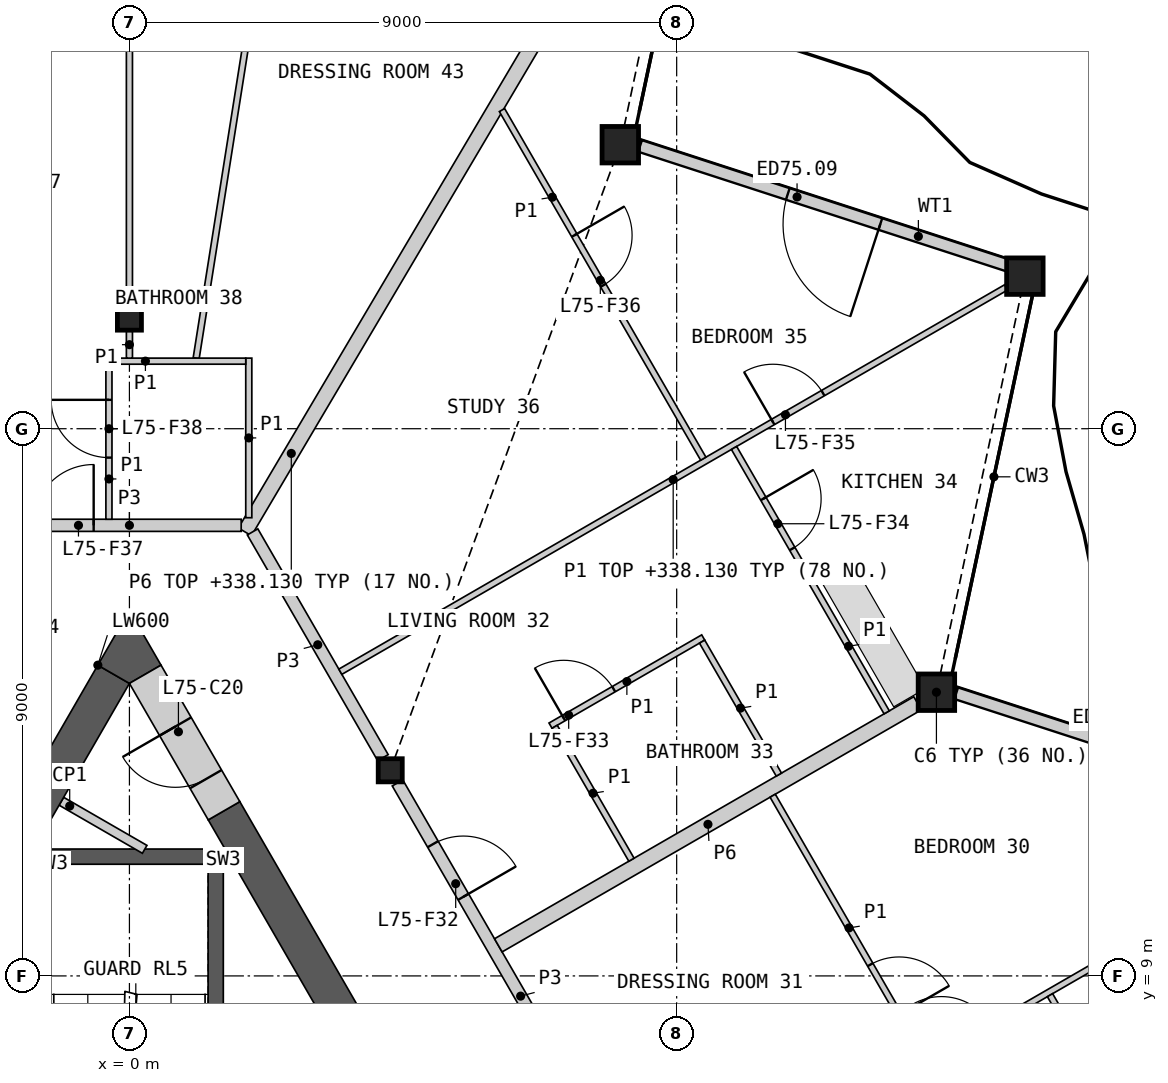
"""IFC4 building model, lengths in metres.
Left out: names, types, materials, properties, quantities, classifications, styles, units other than length and angle.
Written with IfcOpenShell. Run it as: python <this file> out.ifc"""

import sys

from ifc_helpers import new_model, si_unit, direction, frame, frame_2d, origin, origin_2d, place, context, subcontext, project, spatial, polyline, rectangle, hollow_rectangle, i_section, outline, extrude, element, fill, save


model = new_model("IFC4")
c1 = context("Model", 3, precision=1e-05, world=origin(), true_north=direction((0.0, 1.0)))
c2 = subcontext(c1, "Body", "Model", "MODEL_VIEW")
j1 = project(units=[si_unit("LENGTHUNIT", "METRE"), si_unit("PLANEANGLEUNIT", "RADIAN")], contexts=[c1])
p1 = place(None, origin())
s1 = spatial("IfcSite", under=j1, at=p1, CompositionType="ELEMENT")
p2 = place(p1, origin())
s2 = spatial("IfcBuilding", under=s1, at=p2, CompositionType="ELEMENT")
p3 = place(p2, frame((0.0, 0.0, 335.8)))
s3 = spatial("IfcBuildingStorey", under=s2, at=p3, CompositionType="ELEMENT", Elevation=335.8)
for number, where, z_axis, x_axis in (
    (1, (13.272, 13.666, 0.0), (0.0, 0.0, 1.0), (1.0, 0.0, 0.0)),
    (2, (14.727, 20.509, 0.0), (0.0, 0.0, 1.0), (1.0, 0.0, 0.0)),
    (3, (8.073, 22.671, 0.0), (0.0, 0.0, 1.0), (1.0, 0.0, 0.0)),
):
    element("IfcColumn", number, at=place(p3, frame(where, z_axis=z_axis, x_axis=x_axis)), inside=s3, PredefinedType="COLUMN", context=c2, shape_type="SweptSolid", body=[
        extrude(hollow_rectangle(XDim=0.6, YDim=0.6, WallThickness=0.04, at=origin_2d()), origin(), (0.0, 0.0, 1.0), 3.4),
    ])
for number, where, z_axis, x_axis in (
    (4, (0.0, 19.811, 0.0), (0.0, 0.0, 1.0), (1.0, 0.0, 0.0)),
    (5, (4.289, 12.382, 0.0), (0.0, 0.0, 1.0), (1.0, 0.0, 0.0)),
):
    element("IfcColumn", number, at=place(p3, frame(where, z_axis=z_axis, x_axis=x_axis)), inside=s3, PredefinedType="COLUMN", context=c2, shape_type="SweptSolid", body=[
        extrude(i_section(OverallWidth=0.396, OverallDepth=0.381, WebThickness=0.019, FlangeThickness=0.03, at=origin_2d()), origin(), (0.0, 0.0, 1.0), 3.4),
    ])
p4 = place(p3, frame((19.697, 11.667, 0.0), z_axis=(0.0, 0.0, 1.0), x_axis=(-0.951053926112, 0.309024966026, 0.0)))
e6 = element("IfcWall", 6, at=p4, inside=s3, PredefinedType="SOLIDWALL", context=c2, shape_type="SweptSolid", body=[
    extrude(rectangle(XDim=6.414, YDim=0.2, at=frame_2d((3.207, 0.0))), origin(), (0.0, 0.0, 1.0), 2.488),
])
p5 = place(p4, frame((2.262, 0.0, 0.0)))
e7 = element("IfcOpeningElement", 7, at=p5, cuts=e6, PredefinedType="OPENING", context=c2, shape_type="SweptSolid", body=[
    extrude(rectangle(XDim=1.6, YDim=2.25, at=frame_2d((0.8, 1.125))), frame((0.0, 0.11, 0.0), z_axis=(0.0, -1.0, 0.0), x_axis=(1.0, 0.0, 0.0)), (0.0, 0.0, 1.0), 0.22),
])
p6 = place(p3, frame((14.501, 20.667, 0.0), z_axis=(0.0, 0.0, 1.0), x_axis=(-0.951049165164, 0.309039617915, 0.0)))
e8 = element("IfcWall", 8, at=p6, inside=s3, PredefinedType="SOLIDWALL", context=c2, shape_type="SweptSolid", body=[
    extrude(rectangle(XDim=6.417, YDim=0.2, at=frame_2d((3.208, 0.0))), origin(), (0.0, 0.0, 1.0), 2.488),
])
p7 = place(p6, frame((2.262, 0.0, 0.0)))
e9 = element("IfcOpeningElement", 9, at=p7, cuts=e8, PredefinedType="OPENING", context=c2, shape_type="SweptSolid", body=[
    extrude(rectangle(XDim=1.6, YDim=2.25, at=frame_2d((0.8, 1.125))), frame((0.0, 0.11, 0.0), z_axis=(0.0, -1.0, 0.0), x_axis=(1.0, 0.0, 0.0)), (0.0, 0.0, 1.0), 0.22),
])
p8 = place(p3, origin())
e10 = element("IfcWall", 10, at=p8, inside=s3, PredefinedType="SHEAR", context=c2, shape_type="SweptSolid", body=[
    extrude(outline(polyline([(1.544, 5.237), (1.544, 11.087), (1.294, 10.837), (1.294, 5.237), (1.544, 5.237)])), origin(), (0.0, 0.0, 1.0), 3.1),
])
p9 = place(p3, origin())
e11 = element("IfcWall", 11, at=p9, inside=s3, PredefinedType="SHEAR", context=c2, shape_type="SweptSolid", body=[
    extrude(outline(polyline([(1.544, 11.087), (-1.544, 11.087), (-1.294, 10.837), (1.294, 10.837), (1.544, 11.087)])), origin(), (0.0, 0.0, 1.0), 3.1),
])
p10 = place(p3, frame((-1.119, 11.873, 0.0), z_axis=(0.0, 0.0, 1.0), x_axis=(0.865992812752, -0.500056445075, 0.0)))
e12 = element("IfcWall", 12, at=p10, inside=s3, PredefinedType="PARTITIONING", context=c2, shape_type="SweptSolid", body=[
    extrude(rectangle(XDim=1.582, YDim=0.15, at=frame_2d((0.791, 0.0))), origin(), (0.0, 0.0, 1.0), 3.1),
])
p11 = place(p3, frame((8.841, -0.902, 0.0), z_axis=(0.0, 0.0, 1.0), x_axis=(-0.499995618375, 0.866027933502, 0.0)))
e13 = element("IfcWall", 13, at=p11, inside=s3, PredefinedType="SHEAR", context=c2, shape_type="SweptSolid", body=[
    extrude(rectangle(XDim=14.571, YDim=0.6, at=frame_2d((7.285, 0.0))), origin(), (0.0, 0.0, 1.0), 3.1),
])
p12 = place(p3, frame((-0.26, 13.961, 0.0), z_axis=(0.0, 0.0, 1.0), x_axis=(-0.499980485389, -0.866036670257, 0.0)))
e14 = element("IfcWall", 14, at=p12, inside=s3, PredefinedType="SHEAR", context=c2, shape_type="SweptSolid", body=[
    extrude(rectangle(XDim=4.559, YDim=0.6, at=frame_2d((2.28, 0.0))), origin(), (0.0, 0.0, 1.0), 3.1),
])
p13 = place(p3, origin())
e15 = element("IfcWall", 15, at=p13, inside=s3, PredefinedType="SHEAR", context=c2, shape_type="SweptSolid", body=[
    extrude(outline(polyline([(-0.52, 14.111), (0.0, 15.011), (0.52, 14.111), (0.0, 13.811), (-0.52, 14.111)])), origin(), (0.0, 0.0, 1.0), 3.1),
])
p14 = place(p3, frame((1.556, 11.716, 0.0), z_axis=(0.0, 0.0, 1.0), x_axis=(-0.500018667571, 0.866014625789, 0.0)))
e16 = element("IfcWall", 16, at=p14, inside=s3, PredefinedType="SHEAR", context=c2, shape_type="SweptSolid", body=[
    extrude(rectangle(XDim=2.592, YDim=0.6, at=frame_2d((1.296, 0.0))), origin(), (0.0, 0.0, 1.0), 3.1),
])
p15 = place(p14, frame((0.6, 0.0, 0.0)))
e17 = element("IfcOpeningElement", 17, at=p15, cuts=e16, PredefinedType="OPENING", context=c2, shape_type="SweptSolid", body=[
    extrude(rectangle(XDim=1.0, YDim=2.1, at=frame_2d((0.5, 1.05))), frame((0.0, 0.31, 0.0), z_axis=(0.0, -1.0, 0.0), x_axis=(1.0, 0.0, 0.0)), (0.0, 0.0, 1.0), 0.62),
])
p16 = place(p3, frame((1.899, 16.303, 0.0), z_axis=(0.0, 0.0, 1.0), x_axis=(0.508895604687, 0.860828242758, 0.0)))
e18 = element("IfcWall", 18, at=p16, inside=s3, PredefinedType="PARTITIONING", context=c2, shape_type="SweptSolid", body=[
    extrude(rectangle(XDim=14.986, YDim=0.25, at=frame_2d((7.493, 0.0))), origin(), (0.0, 0.0, 1.0), 2.33),
])
p17 = place(p3, frame((4.409, 12.174, 0.0), z_axis=(0.0, 0.0, 1.0), x_axis=(0.499984266882, -0.866034487114, 0.0)))
e19 = element("IfcWall", 19, at=p17, inside=s3, PredefinedType="PARTITIONING", context=c2, shape_type="SweptSolid", body=[
    extrude(rectangle(XDim=8.099, YDim=0.2, at=frame_2d((4.049, 0.0))), origin(), (0.0, 0.0, 1.0), 3.1),
])
p18 = place(p17, frame((1.164, 0.0, 0.0)))
e20 = element("IfcOpeningElement", 20, at=p18, cuts=e19, PredefinedType="OPENING", context=c2, shape_type="SweptSolid", body=[
    extrude(rectangle(XDim=1.0, YDim=2.1, at=frame_2d((0.5, 1.05))), frame((0.0, 0.11, 0.0), z_axis=(0.0, -1.0, 0.0), x_axis=(1.0, 0.0, 0.0)), (0.0, 0.0, 1.0), 0.22),
])
p19 = place(p3, frame((6.067, 9.503, 0.0), z_axis=(0.0, 0.0, 1.0), x_axis=(0.866032392051, 0.499987895772, 0.0)))
e21 = element("IfcWall", 21, at=p19, inside=s3, PredefinedType="PARTITIONING", context=c2, shape_type="SweptSolid", body=[
    extrude(rectangle(XDim=7.962, YDim=0.25, at=frame_2d((3.981, 0.0))), origin(), (0.0, 0.0, 1.0), 2.33),
])
p20 = place(p3, frame((2.025, 16.303, 0.0), z_axis=(0.0, 0.0, 1.0), x_axis=(0.499978750566, -0.866037671803, 0.0)))
e22 = element("IfcWall", 22, at=p20, inside=s3, PredefinedType="PARTITIONING", context=c2, shape_type="SweptSolid", body=[
    extrude(rectangle(XDim=4.288, YDim=0.2, at=frame_2d((2.144, 0.0))), origin(), (0.0, 0.0, 1.0), 3.1),
])
p21 = place(p3, frame((-1.838, 16.411, 0.0), z_axis=(0.0, 0.0, 1.0), x_axis=(1.0, 0.0, 0.0)))
e23 = element("IfcWall", 23, at=p21, inside=s3, PredefinedType="PARTITIONING", context=c2, shape_type="SweptSolid", body=[
    extrude(rectangle(XDim=3.676, YDim=0.2, at=frame_2d((1.838, 0.0))), origin(), (0.0, 0.0, 1.0), 3.1),
])
p22 = place(p21, frame((0.25, 0.0, 0.0)))
e24 = element("IfcOpeningElement", 24, at=p22, cuts=e23, PredefinedType="OPENING", context=c2, shape_type="SweptSolid", body=[
    extrude(rectangle(XDim=1.0, YDim=2.1, at=frame_2d((0.5, 1.05))), frame((0.0, 0.11, 0.0), z_axis=(0.0, -1.0, 0.0), x_axis=(1.0, 0.0, 0.0)), (0.0, 0.0, 1.0), 0.22),
])
p23 = place(p3, frame((3.469, 14.003, 0.0), z_axis=(0.0, 0.0, 1.0), x_axis=(0.866021563384, 0.50000665171, 0.0)))
e25 = element("IfcWall", 25, at=p23, inside=s3, PredefinedType="PARTITIONING", context=c2, shape_type="SweptSolid", body=[
    extrude(rectangle(XDim=12.641, YDim=0.1, at=frame_2d((6.321, 0.0))), origin(), (0.0, 0.0, 1.0), 2.33),
])
p24 = place(p23, frame((8.215, 0.0, 0.0)))
e26 = element("IfcOpeningElement", 26, at=p24, cuts=e25, PredefinedType="OPENING", context=c2, shape_type="SweptSolid", body=[
    extrude(rectangle(XDim=0.95, YDim=2.1, at=frame_2d((0.475, 1.05))), frame((0.0, 0.06, 0.0), z_axis=(0.0, -1.0, 0.0), x_axis=(1.0, 0.0, 0.0)), (0.0, 0.0, 1.0), 0.12),
])
p25 = place(p3, frame((8.786, 5.073, 0.0), z_axis=(0.0, 0.0, 1.0), x_axis=(0.86602139559, 0.500006942333, 0.0)))
e27 = element("IfcWall", 27, at=p25, inside=s3, PredefinedType="PARTITIONING", context=c2, shape_type="SweptSolid", body=[
    extrude(rectangle(XDim=12.505, YDim=0.1, at=frame_2d((6.252, 0.0))), origin(), (0.0, 0.0, 1.0), 2.33),
])
p26 = place(p25, frame((5.275, 0.0, 0.0)))
e28 = element("IfcOpeningElement", 28, at=p26, cuts=e27, PredefinedType="OPENING", context=c2, shape_type="SweptSolid", body=[
    extrude(rectangle(XDim=0.95, YDim=2.1, at=frame_2d((0.475, 1.05))), frame((0.0, 0.06, 0.0), z_axis=(0.0, -1.0, 0.0), x_axis=(1.0, 0.0, 0.0)), (0.0, 0.0, 1.0), 0.12),
])
p27 = place(p3, frame((1.098, 19.16, 0.0), z_axis=(0.0, 0.0, 1.0), x_axis=(0.156426176129, 0.987689653394, 0.0)))
e29 = element("IfcWall", 29, at=p27, inside=s3, PredefinedType="PARTITIONING", context=c2, shape_type="SweptSolid", body=[
    extrude(rectangle(XDim=12.358, YDim=0.1, at=frame_2d((6.179, 0.0))), origin(), (0.0, 0.0, 1.0), 2.33),
])
p28 = place(p27, frame((7.255, 0.0, 0.0)))
e30 = element("IfcOpeningElement", 30, at=p28, cuts=e29, PredefinedType="OPENING", context=c2, shape_type="SweptSolid", body=[
    extrude(rectangle(XDim=0.95, YDim=2.1, at=frame_2d((0.475, 1.05))), frame((0.0, 0.06, 0.0), z_axis=(0.0, -1.0, 0.0), x_axis=(1.0, 0.0, 0.0)), (0.0, 0.0, 1.0), 0.12),
])
p29 = place(p3, frame((0.0, 20.019, 0.0), z_axis=(0.0, 0.0, 1.0), x_axis=(0.0, 1.0, 0.0)))
e31 = element("IfcWall", 31, at=p29, inside=s3, PredefinedType="PARTITIONING", context=c2, shape_type="SweptSolid", body=[
    extrude(rectangle(XDim=11.347, YDim=0.1, at=frame_2d((5.674, 0.0))), origin(), (0.0, 0.0, 1.0), 2.33),
])
p30 = place(p29, frame((7.723, 0.0, 0.0)))
e32 = element("IfcOpeningElement", 32, at=p30, cuts=e31, PredefinedType="OPENING", context=c2, shape_type="SweptSolid", body=[
    extrude(rectangle(XDim=0.95, YDim=2.1, at=frame_2d((0.475, 1.05))), frame((0.0, 0.06, 0.0), z_axis=(0.0, -1.0, 0.0), x_axis=(1.0, 0.0, 0.0)), (0.0, 0.0, 1.0), 0.12),
])
p31 = place(p3, frame((6.127, 23.241, 0.0), z_axis=(0.0, 0.0, 1.0), x_axis=(0.500021410345, -0.866013042163, 0.0)))
e33 = element("IfcWall", 33, at=p31, inside=s3, PredefinedType="PARTITIONING", context=c2, shape_type="SweptSolid", body=[
    extrude(rectangle(XDim=6.621, YDim=0.1, at=frame_2d((3.311, 0.0))), origin(), (0.0, 0.0, 1.0), 2.33),
])
p32 = place(p31, frame((2.379, 0.0, 0.0)))
e34 = element("IfcOpeningElement", 34, at=p32, cuts=e33, PredefinedType="OPENING", context=c2, shape_type="SweptSolid", body=[
    extrude(rectangle(XDim=0.95, YDim=2.1, at=frame_2d((0.475, 1.05))), frame((0.0, 0.06, 0.0), z_axis=(0.0, -1.0, 0.0), x_axis=(1.0, 0.0, 0.0)), (0.0, 0.0, 1.0), 0.12),
])
p33 = place(p3, frame((10.579, 11.964, 0.0), z_axis=(0.0, 0.0, 1.0), x_axis=(0.499972176429, -0.866041467135, 0.0)))
e35 = element("IfcWall", 35, at=p33, inside=s3, PredefinedType="PARTITIONING", context=c2, shape_type="SweptSolid", body=[
    extrude(rectangle(XDim=5.021, YDim=0.1, at=frame_2d((2.511, 0.0))), origin(), (0.0, 0.0, 1.0), 2.33),
])
p34 = place(p33, frame((3.209, 0.0, 0.0)))
e36 = element("IfcOpeningElement", 36, at=p34, cuts=e35, PredefinedType="OPENING", context=c2, shape_type="SweptSolid", body=[
    extrude(rectangle(XDim=0.95, YDim=2.1, at=frame_2d((0.475, 1.05))), frame((0.0, 0.06, 0.0), z_axis=(0.0, -1.0, 0.0), x_axis=(1.0, 0.0, 0.0)), (0.0, 0.0, 1.0), 0.12),
])
p35 = place(p3, frame((9.944, 17.684, 0.0), z_axis=(0.0, 0.0, 1.0), x_axis=(0.499972176429, -0.866041467135, 0.0)))
e37 = element("IfcWall", 37, at=p35, inside=s3, PredefinedType="PARTITIONING", context=c2, shape_type="SweptSolid", body=[
    extrude(rectangle(XDim=5.021, YDim=0.1, at=frame_2d((2.511, 0.0))), origin(), (0.0, 0.0, 1.0), 2.33),
])
p36 = place(p35, frame((0.964, 0.0, 0.0)))
e38 = element("IfcOpeningElement", 38, at=p36, cuts=e37, PredefinedType="OPENING", context=c2, shape_type="SweptSolid", body=[
    extrude(rectangle(XDim=0.95, YDim=2.1, at=frame_2d((0.475, 1.05))), frame((0.0, 0.06, 0.0), z_axis=(0.0, -1.0, 0.0), x_axis=(1.0, 0.0, 0.0)), (0.0, 0.0, 1.0), 0.12),
])
p37 = place(p3, frame((15.14, 8.683, 0.0), z_axis=(0.0, 0.0, 1.0), x_axis=(0.499987849973, -0.866032418492, 0.0)))
e39 = element("IfcWall", 39, at=p37, inside=s3, PredefinedType="PARTITIONING", context=c2, shape_type="SweptSolid", body=[
    extrude(rectangle(XDim=5.096, YDim=0.1, at=frame_2d((2.548, 0.0))), origin(), (0.0, 0.0, 1.0), 2.33),
])
p38 = place(p37, frame((0.554, 0.0, 0.0)))
e40 = element("IfcOpeningElement", 40, at=p38, cuts=e39, PredefinedType="OPENING", context=c2, shape_type="SweptSolid", body=[
    extrude(rectangle(XDim=0.95, YDim=2.1, at=frame_2d((0.475, 1.05))), frame((0.0, 0.06, 0.0), z_axis=(0.0, -1.0, 0.0), x_axis=(1.0, 0.0, 0.0)), (0.0, 0.0, 1.0), 0.12),
])
p39 = place(p3, frame((6.925, 13.116, 0.0), z_axis=(0.0, 0.0, 1.0), x_axis=(0.866032775405, 0.499987231761, 0.0)))
e41 = element("IfcWall", 41, at=p39, inside=s3, PredefinedType="PARTITIONING", context=c2, shape_type="SweptSolid", body=[
    extrude(rectangle(XDim=2.9, YDim=0.1, at=frame_2d((1.45, 0.0))), origin(), (0.0, 0.0, 1.0), 2.33),
])
p40 = place(p39, frame((0.25, 0.0, 0.0)))
e42 = element("IfcOpeningElement", 42, at=p40, cuts=e41, PredefinedType="OPENING", context=c2, shape_type="SweptSolid", body=[
    extrude(rectangle(XDim=0.95, YDim=2.1, at=frame_2d((0.475, 1.05))), frame((0.0, 0.06, 0.0), z_axis=(0.0, -1.0, 0.0), x_axis=(1.0, 0.0, 0.0)), (0.0, 0.0, 1.0), 0.12),
])
p41 = place(p3, frame((-0.337, 16.511, 0.0), z_axis=(0.0, 0.0, 1.0), x_axis=(0.0, 1.0, 0.0)))
e43 = element("IfcWall", 43, at=p41, inside=s3, PredefinedType="PARTITIONING", context=c2, shape_type="SweptSolid", body=[
    extrude(rectangle(XDim=2.65, YDim=0.1, at=frame_2d((1.325, 0.0))), origin(), (0.0, 0.0, 1.0), 2.33),
])
p42 = place(p41, frame((1.014, 0.0, 0.0)))
e44 = element("IfcOpeningElement", 44, at=p42, cuts=e43, PredefinedType="OPENING", context=c2, shape_type="SweptSolid", body=[
    extrude(rectangle(XDim=0.95, YDim=2.1, at=frame_2d((0.475, 1.05))), frame((0.0, 0.06, 0.0), z_axis=(0.0, -1.0, 0.0), x_axis=(1.0, 0.0, 0.0)), (0.0, 0.0, 1.0), 0.12),
])
p43 = place(p3, frame((1.963, 16.536, 0.0), z_axis=(0.0, 0.0, 1.0), x_axis=(0.0, 1.0, 0.0)))
e45 = element("IfcWall", 45, at=p43, inside=s3, PredefinedType="PARTITIONING", context=c2, shape_type="SweptSolid", body=[
    extrude(rectangle(XDim=2.625, YDim=0.1, at=frame_2d((1.312, 0.0))), origin(), (0.0, 0.0, 1.0), 2.33),
])
for number, where, z_axis, x_axis in (
    (46, (9.418, 14.498, 0.0), (0.0, 0.0, 1.0), (0.5, -0.866, 0.0)),
    (47, (6.994, 13.098, 0.0), (0.0, 0.0, 1.0), (0.5, -0.866, 0.0)),
):
    element("IfcWall", number, at=place(p3, frame(where, z_axis=z_axis, x_axis=x_axis)), inside=s3, PredefinedType="PARTITIONING", context=c2, shape_type="SweptSolid", body=[
        extrude(rectangle(XDim=2.525, YDim=0.1, at=frame_2d((1.262, 0.0))), origin(), (0.0, 0.0, 1.0), 2.33),
    ])
p44 = place(p3, frame((-0.287, 19.111, 0.0), z_axis=(0.0, 0.0, 1.0), x_axis=(1.0, 0.0, 0.0)))
e48 = element("IfcWall", 48, at=p44, inside=s3, PredefinedType="PARTITIONING", context=c2, shape_type="SweptSolid", body=[
    extrude(rectangle(XDim=2.2, YDim=0.1, at=frame_2d((1.1, 0.0))), origin(), (0.0, 0.0, 1.0), 2.33),
])
p45 = place(p3, frame((0.0, 19.161, 0.0), z_axis=(0.0, 0.0, 1.0), x_axis=(0.0, 1.0, 0.0)))
e49 = element("IfcWall", 49, at=p45, inside=s3, PredefinedType="PARTITIONING", context=c2, shape_type="SweptSolid", body=[
    extrude(rectangle(XDim=0.442, YDim=0.1, at=frame_2d((0.221, 0.0))), origin(), (0.0, 0.0, 1.0), 2.33),
])
p46 = place(p7, origin())
e50 = element("IfcDoor", 50, at=p46, inside=s3, OperationType="DOUBLE_DOOR_SINGLE_SWING", PredefinedType="DOOR", context=c2, shape_type="SweptSolid", body=[
    extrude(rectangle(XDim=1.6, YDim=2.25, at=frame_2d((0.8, 1.125))), frame((0.0, 0.025, 0.0), z_axis=(0.0, -1.0, 0.0), x_axis=(1.0, 0.0, 0.0)), (0.0, 0.0, 1.0), 0.05),
])
fill(e9, e50)
p47 = place(p15, origin())
e51 = element("IfcDoor", 51, at=p47, inside=s3, OperationType="SINGLE_SWING_RIGHT", PredefinedType="DOOR", context=c2, shape_type="SweptSolid", body=[
    extrude(rectangle(XDim=1.0, YDim=2.1, at=frame_2d((0.5, 1.05))), frame((0.0, 0.055, 0.0), z_axis=(0.0, -1.0, 0.0), x_axis=(1.0, 0.0, 0.0)), (0.0, 0.0, 1.0), 0.05),
])
fill(e17, e51)
p48 = place(p34, origin())
e52 = element("IfcDoor", 52, at=p48, inside=s3, OperationType="SINGLE_SWING_RIGHT", PredefinedType="DOOR", context=c2, shape_type="SweptSolid", body=[
    extrude(rectangle(XDim=0.95, YDim=2.1, at=frame_2d((0.475, 1.05))), frame((0.0, 0.025, 0.0), z_axis=(0.0, -1.0, 0.0), x_axis=(1.0, 0.0, 0.0)), (0.0, 0.0, 1.0), 0.05),
])
fill(e36, e52)
p49 = place(p18, origin())
e53 = element("IfcDoor", 53, at=p49, inside=s3, OperationType="SINGLE_SWING_RIGHT", PredefinedType="DOOR", context=c2, shape_type="SweptSolid", body=[
    extrude(rectangle(XDim=1.0, YDim=2.1, at=frame_2d((0.5, 1.05))), frame((0.0, 0.025, 0.0), z_axis=(0.0, -1.0, 0.0), x_axis=(1.0, 0.0, 0.0)), (0.0, 0.0, 1.0), 0.05),
])
fill(e20, e53)
p50 = place(p40, origin())
e54 = element("IfcDoor", 54, at=p50, inside=s3, OperationType="SINGLE_SWING_LEFT", PredefinedType="DOOR", context=c2, shape_type="SweptSolid", body=[
    extrude(rectangle(XDim=0.95, YDim=2.1, at=frame_2d((0.475, 1.05))), frame((0.0, 0.025, 0.0), z_axis=(0.0, -1.0, 0.0), x_axis=(1.0, 0.0, 0.0)), (0.0, 0.0, 1.0), 0.05),
])
fill(e42, e54)
p51 = place(p36, origin())
e55 = element("IfcDoor", 55, at=p51, inside=s3, OperationType="SINGLE_SWING_LEFT", PredefinedType="DOOR", context=c2, shape_type="SweptSolid", body=[
    extrude(rectangle(XDim=0.95, YDim=2.1, at=frame_2d((0.475, 1.05))), frame((0.0, 0.025, 0.0), z_axis=(0.0, -1.0, 0.0), x_axis=(1.0, 0.0, 0.0)), (0.0, 0.0, 1.0), 0.05),
])
fill(e38, e55)
p52 = place(p24, origin())
e56 = element("IfcDoor", 56, at=p52, inside=s3, OperationType="SINGLE_SWING_LEFT", PredefinedType="DOOR", context=c2, shape_type="SweptSolid", body=[
    extrude(rectangle(XDim=0.95, YDim=2.1, at=frame_2d((0.475, 1.05))), frame((0.0, 0.025, 0.0), z_axis=(0.0, -1.0, 0.0), x_axis=(1.0, 0.0, 0.0)), (0.0, 0.0, 1.0), 0.05),
])
fill(e26, e56)
p53 = place(p32, origin())
e57 = element("IfcDoor", 57, at=p53, inside=s3, OperationType="SINGLE_SWING_LEFT", PredefinedType="DOOR", context=c2, shape_type="SweptSolid", body=[
    extrude(rectangle(XDim=0.95, YDim=2.1, at=frame_2d((0.475, 1.05))), frame((0.0, 0.025, 0.0), z_axis=(0.0, -1.0, 0.0), x_axis=(1.0, 0.0, 0.0)), (0.0, 0.0, 1.0), 0.05),
])
fill(e34, e57)
p54 = place(p22, origin())
e58 = element("IfcDoor", 58, at=p54, inside=s3, OperationType="SINGLE_SWING_RIGHT", PredefinedType="DOOR", context=c2, shape_type="SweptSolid", body=[
    extrude(rectangle(XDim=1.0, YDim=2.1, at=frame_2d((0.5, 1.05))), frame((0.0, 0.025, 0.0), z_axis=(0.0, -1.0, 0.0), x_axis=(1.0, 0.0, 0.0)), (0.0, 0.0, 1.0), 0.05),
])
fill(e24, e58)
p55 = place(p42, origin())
e59 = element("IfcDoor", 59, at=p55, inside=s3, OperationType="SINGLE_SWING_RIGHT", PredefinedType="DOOR", context=c2, shape_type="SweptSolid", body=[
    extrude(rectangle(XDim=0.95, YDim=2.1, at=frame_2d((0.475, 1.05))), frame((0.0, 0.025, 0.0), z_axis=(0.0, -1.0, 0.0), x_axis=(1.0, 0.0, 0.0)), (0.0, 0.0, 1.0), 0.05),
])
fill(e44, e59)
save(model, sys.argv[1])
